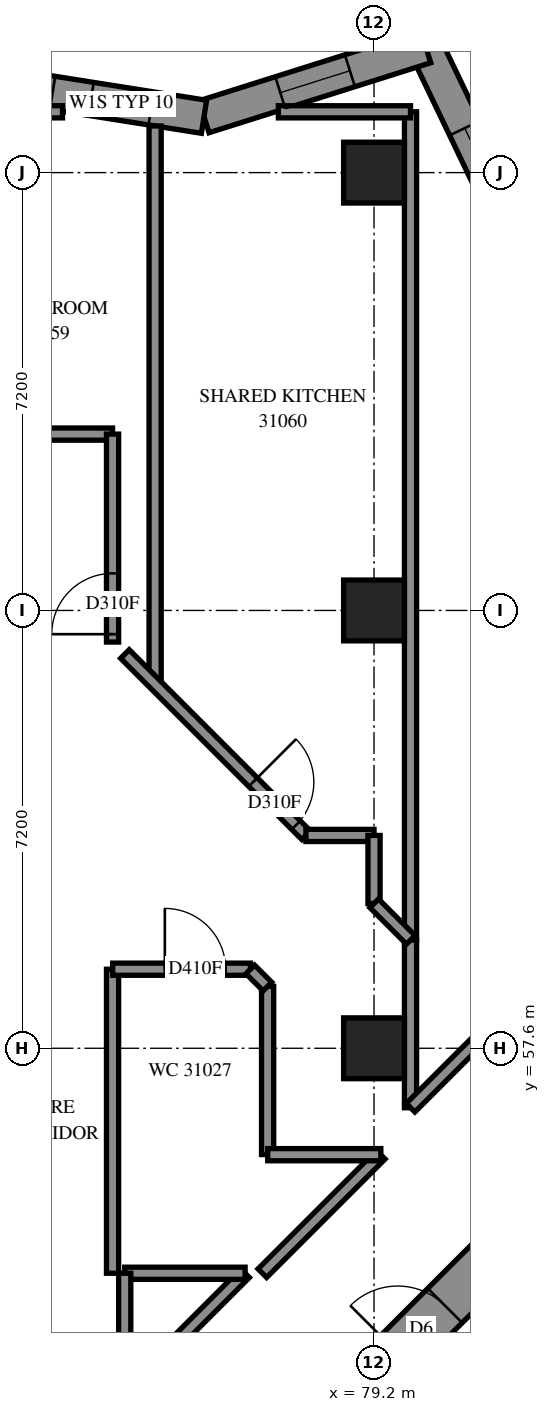
"""IFC4 building model, lengths in metres.
Left out: names, types, materials, properties, quantities, classifications, styles, units other than length and angle.
Written with IfcOpenShell. Run it as: python <this file> out.ifc"""

import sys

from ifc_helpers import new_model, si_unit, direction, frame, frame_2d, origin, origin_2d, place, context, subcontext, project, spatial, polyline, rectangle, outline, extrude, element, fill, save


model = new_model("IFC4")
c1 = context("Model", 3, precision=1e-05, world=origin(), true_north=direction((0.0, 1.0)))
c2 = subcontext(c1, "Body", "Model", "MODEL_VIEW")
j1 = project(units=[si_unit("LENGTHUNIT", "METRE"), si_unit("PLANEANGLEUNIT", "RADIAN")], contexts=[c1])
p1 = place(None, origin())
s1 = spatial("IfcSite", under=j1, at=p1, CompositionType="ELEMENT")
p2 = place(p1, origin())
s2 = spatial("IfcBuilding", under=s1, at=p2, CompositionType="ELEMENT")
p3 = place(p2, frame((0.0, 0.0, 115.2)))
s3 = spatial("IfcBuildingStorey", under=s2, at=p3, CompositionType="ELEMENT", Elevation=115.2)
for number, where, z_axis, x_axis in (
    (1, (79.2, 57.6, 0.0), (0.0, 0.0, 1.0), (1.0, 0.0, 0.0)),
    (2, (79.2, 64.8, 0.0), (0.0, 0.0, 1.0), (1.0, 0.0, 0.0)),
    (3, (79.2, 72.0, 0.0), (0.0, 0.0, 1.0), (1.0, 0.0, 0.0)),
):
    element("IfcColumn", number, at=place(p3, frame(where, z_axis=z_axis, x_axis=x_axis)), inside=s3, PredefinedType="COLUMN", context=c2, shape_type="SweptSolid", body=[
        extrude(rectangle(XDim=1.0, YDim=1.0, at=origin_2d()), origin(), (0.0, 0.0, 1.0), 3.1),
    ])
p4 = place(p3, frame((76.372, 49.373, -0.3), z_axis=(0.0, 0.0, 1.0), x_axis=(0.7071067812, 0.7071067812, 0.0)))
e4 = element("IfcWall", 4, at=p4, inside=s3, PredefinedType="SHEAR", context=c2, shape_type="SweptSolid", body=[
    extrude(rectangle(XDim=14.4, YDim=0.8, at=frame_2d((7.2, 0.0))), origin(), (0.0, 0.0, 1.0), 2.7),
])
p5 = place(p4, frame((4.55, 0.0, 0.3)))
e5 = element("IfcOpeningElement", 5, at=p5, cuts=e4, PredefinedType="OPENING", context=c2, shape_type="SweptSolid", body=[
    extrude(rectangle(XDim=1.1, YDim=2.1, at=frame_2d((0.55, 1.05))), frame((0.0, 0.41, 0.0), z_axis=(0.0, -1.0, 0.0), x_axis=(1.0, 0.0, 0.0)), (0.0, 0.0, 1.0), 0.82),
])
p6 = place(p4, frame((11.35, 0.0, 0.3)))
e6 = element("IfcOpeningElement", 6, at=p6, cuts=e4, PredefinedType="OPENING", context=c2, shape_type="SweptSolid", body=[
    extrude(rectangle(XDim=1.1, YDim=2.1, at=frame_2d((0.55, 1.05))), frame((0.0, 0.41, 0.0), z_axis=(0.0, -1.0, 0.0), x_axis=(1.0, 0.0, 0.0)), (0.0, 0.0, 1.0), 0.82),
])
p7 = place(p3, frame((81.542, 70.954, 0.0), z_axis=(0.0, 0.0, 1.0), x_axis=(-0.4318929932, 0.9019248541, 0.0)))
e7 = element("IfcWall", 7, at=p7, inside=s3, PredefinedType="SOLIDWALL", context=c2, shape_type="SweptSolid", body=[
    extrude(outline(polyline([(0.072, -0.275), (3.692, -0.275), (3.215, 0.275), (-0.072, 0.275), (0.072, -0.275)])), origin(), (0.0, 0.0, 1.0), 3.1),
])
p8 = place(p7, frame((0.77, 0.0, 0.5)))
e8 = element("IfcOpeningElement", 8, at=p8, cuts=e7, PredefinedType="OPENING", context=c2, shape_type="SweptSolid", body=[
    extrude(rectangle(XDim=1.2, YDim=2.45, at=frame_2d((0.6, 1.225))), frame((0.0, 0.285, 0.0), z_axis=(0.0, -1.0, 0.0), x_axis=(1.0, 0.0, 0.0)), (0.0, 0.0, 1.0), 0.57),
])
p9 = place(p3, frame((80.05, 74.069, 0.0), z_axis=(0.0, 0.0, 1.0), x_axis=(-0.9536522041, -0.3009110726, 0.0)))
e9 = element("IfcWall", 9, at=p9, inside=s3, PredefinedType="SOLIDWALL", context=c2, shape_type="SweptSolid", body=[
    extrude(outline(polyline([(-0.239, -0.275), (3.759, -0.275), (3.889, 0.275), (0.239, 0.275), (-0.239, -0.275)])), origin(), (0.0, 0.0, 1.0), 3.1),
])
p10 = place(p9, frame((1.308, 0.0, 0.5)))
e10 = element("IfcOpeningElement", 10, at=p10, cuts=e9, PredefinedType="OPENING", context=c2, shape_type="SweptSolid", body=[
    extrude(rectangle(XDim=1.2, YDim=2.45, at=frame_2d((0.6, 1.225))), frame((0.0, 0.285, 0.0), z_axis=(0.0, -1.0, 0.0), x_axis=(1.0, 0.0, 0.0)), (0.0, 0.0, 1.0), 0.57),
])
p11 = place(p3, frame((76.404, 72.918, 0.0), z_axis=(0.0, 0.0, 1.0), x_axis=(-0.9877221932, 0.1562205785, 0.0)))
e11 = element("IfcWall", 11, at=p11, inside=s3, PredefinedType="SOLIDWALL", context=c2, shape_type="SweptSolid", body=[
    extrude(outline(polyline([(0.065, -0.275), (3.925, -0.275), (3.838, 0.275), (-0.065, 0.275), (0.065, -0.275)])), origin(), (0.0, 0.0, 1.0), 3.1),
])
p12 = place(p11, frame((0.88, 0.0, 0.45)))
e12 = element("IfcOpeningElement", 12, at=p12, cuts=e11, PredefinedType="OPENING", context=c2, shape_type="SweptSolid", body=[
    extrude(rectangle(XDim=1.0, YDim=2.5, at=frame_2d((0.5, 1.25))), frame((0.0, 0.285, 0.0), z_axis=(0.0, -1.0, 0.0), x_axis=(1.0, 0.0, 0.0)), (0.0, 0.0, 1.0), 0.57),
])
p13 = place(p11, frame((2.521, 0.0, 0.45)))
e13 = element("IfcOpeningElement", 13, at=p13, cuts=e11, PredefinedType="OPENING", context=c2, shape_type="SweptSolid", body=[
    extrude(rectangle(XDim=1.0, YDim=2.5, at=frame_2d((0.5, 1.25))), frame((0.0, 0.285, 0.0), z_axis=(0.0, -1.0, 0.0), x_axis=(1.0, 0.0, 0.0)), (0.0, 0.0, 1.0), 0.57),
])
p14 = place(p3, frame((54.7, 67.7, 0.0), z_axis=(0.0, 0.0, 1.0), x_axis=(1.0, 0.0, 0.0)))
e14 = element("IfcWall", 14, at=p14, inside=s3, PredefinedType="PARTITIONING", context=c2, shape_type="SweptSolid", body=[
    extrude(rectangle(XDim=20.2, YDim=0.2, at=frame_2d((10.1, 0.0))), origin(), (0.0, 0.0, 1.0), 3.1),
])
p15 = place(p14, frame((5.2, 0.0, 0.0)))
e15 = element("IfcOpeningElement", 15, at=p15, cuts=e14, PredefinedType="OPENING", context=c2, shape_type="SweptSolid", body=[
    extrude(rectangle(XDim=0.9, YDim=2.1, at=frame_2d((0.45, 1.05))), frame((0.0, 0.11, 0.0), z_axis=(0.0, -1.0, 0.0), x_axis=(1.0, 0.0, 0.0)), (0.0, 0.0, 1.0), 0.22),
])
p16 = place(p14, frame((8.838, 0.0, 0.0)))
e16 = element("IfcOpeningElement", 16, at=p16, cuts=e14, PredefinedType="OPENING", context=c2, shape_type="SweptSolid", body=[
    extrude(rectangle(XDim=1.0, YDim=2.1, at=frame_2d((0.5, 1.05))), frame((0.0, 0.11, 0.0), z_axis=(0.0, -1.0, 0.0), x_axis=(1.0, 0.0, 0.0)), (0.0, 0.0, 1.0), 0.22),
])
p17 = place(p14, frame((14.1, 0.0, 0.0)))
e17 = element("IfcOpeningElement", 17, at=p17, cuts=e14, PredefinedType="OPENING", context=c2, shape_type="SweptSolid", body=[
    extrude(rectangle(XDim=0.9, YDim=2.1, at=frame_2d((0.45, 1.05))), frame((0.0, 0.11, 0.0), z_axis=(0.0, -1.0, 0.0), x_axis=(1.0, 0.0, 0.0)), (0.0, 0.0, 1.0), 0.22),
])
p18 = place(p3, frame((79.8, 59.38, 0.0), z_axis=(0.0, 0.0, 1.0), x_axis=(0.0, 1.0, 0.0)))
e18 = element("IfcWall", 18, at=p18, inside=s3, PredefinedType="PARTITIONING", context=c2, shape_type="SweptSolid", body=[
    extrude(rectangle(XDim=13.62, YDim=0.2, at=frame_2d((6.81, 0.0))), origin(), (0.0, 0.0, 1.0), 3.1),
])
p19 = place(p3, frame((75.6, 63.58, 0.0), z_axis=(0.0, 0.0, 1.0), x_axis=(0.0, 1.0, 0.0)))
e19 = element("IfcWall", 19, at=p19, inside=s3, PredefinedType="PARTITIONING", context=c2, shape_type="SweptSolid", body=[
    extrude(rectangle(XDim=9.187, YDim=0.2, at=frame_2d((4.593, 0.0))), origin(), (0.0, 0.0, 1.0), 3.1),
])
p20 = place(p3, frame((74.9, 53.9, 0.0), z_axis=(0.0, 0.0, 1.0), x_axis=(0.0, 1.0, 0.0)))
e20 = element("IfcWall", 20, at=p20, inside=s3, PredefinedType="PARTITIONING", context=c2, shape_type="SweptSolid", body=[
    extrude(rectangle(XDim=5.0, YDim=0.2, at=frame_2d((2.5, 0.0))), origin(), (0.0, 0.0, 1.0), 3.1),
])
p21 = place(p3, frame((75.103, 64.083, 0.0), z_axis=(0.0, 0.0, 1.0), x_axis=(0.7071067812, -0.7071067812, 0.0)))
e21 = element("IfcWall", 21, at=p21, inside=s3, PredefinedType="PARTITIONING", context=c2, shape_type="SweptSolid", body=[
    extrude(rectangle(XDim=4.214, YDim=0.2, at=frame_2d((2.107, 0.0))), origin(), (0.0, 0.0, 1.0), 3.1),
])
p22 = place(p21, frame((2.979, 0.0, 0.0)))
e22 = element("IfcOpeningElement", 22, at=p22, cuts=e21, PredefinedType="OPENING", context=c2, shape_type="SweptSolid", body=[
    extrude(rectangle(XDim=1.0, YDim=2.1, at=frame_2d((0.5, 1.05))), frame((0.0, 0.11, 0.0), z_axis=(0.0, -1.0, 0.0), x_axis=(1.0, 0.0, 0.0)), (0.0, 0.0, 1.0), 0.22),
])
p23 = place(p3, frame((74.9, 64.28, 0.0), z_axis=(0.0, 0.0, 1.0), x_axis=(0.0, 1.0, 0.0)))
e23 = element("IfcWall", 23, at=p23, inside=s3, PredefinedType="PARTITIONING", context=c2, shape_type="SweptSolid", body=[
    extrude(rectangle(XDim=3.42, YDim=0.2, at=frame_2d((1.71, 0.0))), origin(), (0.0, 0.0, 1.0), 3.1),
])
p24 = place(p23, frame((0.13, 0.0, 0.0)))
e24 = element("IfcOpeningElement", 24, at=p24, cuts=e23, PredefinedType="OPENING", context=c2, shape_type="SweptSolid", body=[
    extrude(rectangle(XDim=1.0, YDim=2.1, at=frame_2d((0.5, 1.05))), frame((0.0, 0.11, 0.0), z_axis=(0.0, -1.0, 0.0), x_axis=(1.0, 0.0, 0.0)), (0.0, 0.0, 1.0), 0.22),
])
p25 = place(p3, frame((71.064, 73.0, 0.0), z_axis=(0.0, 0.0, 1.0), x_axis=(1.0, 0.0, 0.0)))
e25 = element("IfcWall", 25, at=p25, inside=s3, PredefinedType="PARTITIONING", context=c2, shape_type="SweptSolid", body=[
    extrude(rectangle(XDim=3.013, YDim=0.2, at=frame_2d((1.506, 0.0))), origin(), (0.0, 0.0, 1.0), 3.1),
])
p26 = place(p3, frame((75.102, 51.922, 0.0), z_axis=(0.0, 0.0, 1.0), x_axis=(0.7071067812, 0.7071067812, 0.0)))
e26 = element("IfcWall", 26, at=p26, inside=s3, PredefinedType="PARTITIONING", context=c2, shape_type="SweptSolid", body=[
    extrude(rectangle(XDim=2.797, YDim=0.2, at=frame_2d((1.399, 0.0))), origin(), (0.0, 0.0, 1.0), 3.1),
])
p27 = place(p3, frame((77.45, 55.852, 0.0), z_axis=(0.0, 0.0, 1.0), x_axis=(0.0, 1.0, 0.0)))
e27 = element("IfcWall", 27, at=p27, inside=s3, PredefinedType="PARTITIONING", context=c2, shape_type="SweptSolid", body=[
    extrude(rectangle(XDim=2.766, YDim=0.2, at=frame_2d((1.383, 0.0))), origin(), (0.0, 0.0, 1.0), 3.1),
])
p28 = place(p3, frame((79.8, 56.622, 0.0), z_axis=(0.0, 0.0, 1.0), x_axis=(0.0, 1.0, 0.0)))
e28 = element("IfcWall", 28, at=p28, inside=s3, PredefinedType="PARTITIONING", context=c2, shape_type="SweptSolid", body=[
    extrude(rectangle(XDim=2.758, YDim=0.2, at=frame_2d((1.379, 0.0))), origin(), (0.0, 0.0, 1.0), 3.1),
])
p29 = place(p3, frame((77.363, 53.901, 0.0), z_axis=(0.0, 0.0, 1.0), x_axis=(0.7071067812, 0.7071067812, 0.0)))
e29 = element("IfcWall", 29, at=p29, inside=s3, PredefinedType="PARTITIONING", context=c2, shape_type="SweptSolid", body=[
    extrude(rectangle(XDim=2.755, YDim=0.2, at=frame_2d((1.377, 0.0))), origin(), (0.0, 0.0, 1.0), 3.1),
])
p30 = place(p3, frame((74.902, 58.9, 0.0), z_axis=(0.0, 0.0, 1.0), x_axis=(1.0, 0.0, 0.0)))
e30 = element("IfcWall", 30, at=p30, inside=s3, PredefinedType="PARTITIONING", context=c2, shape_type="SweptSolid", body=[
    extrude(rectangle(XDim=2.266, YDim=0.2, at=frame_2d((1.133, 0.0))), origin(), (0.0, 0.0, 1.0), 3.1),
])
p31 = place(p30, frame((0.858, 0.0, 0.0)))
e31 = element("IfcOpeningElement", 31, at=p31, cuts=e30, PredefinedType="OPENING", context=c2, shape_type="SweptSolid", body=[
    extrude(rectangle(XDim=1.0, YDim=2.1, at=frame_2d((0.5, 1.05))), frame((0.0, 0.11, 0.0), z_axis=(0.0, -1.0, 0.0), x_axis=(1.0, 0.0, 0.0)), (0.0, 0.0, 1.0), 0.22),
])
p32 = place(p3, frame((77.627, 73.0, 0.0), z_axis=(0.0, 0.0, 1.0), x_axis=(1.0, 0.0, 0.0)))
e32 = element("IfcWall", 32, at=p32, inside=s3, PredefinedType="PARTITIONING", context=c2, shape_type="SweptSolid", body=[
    extrude(rectangle(XDim=2.173, YDim=0.2, at=frame_2d((1.087, 0.0))), origin(), (0.0, 0.0, 1.0), 3.1),
])
p33 = place(p3, frame((75.1, 53.9, 0.0), z_axis=(0.0, 0.0, 1.0), x_axis=(1.0, 0.0, 0.0)))
e33 = element("IfcWall", 33, at=p33, inside=s3, PredefinedType="PARTITIONING", context=c2, shape_type="SweptSolid", body=[
    extrude(rectangle(XDim=1.98, YDim=0.2, at=frame_2d((0.99, 0.0))), origin(), (0.0, 0.0, 1.0), 3.1),
])
p34 = place(p3, frame((75.1, 51.922, 0.0), z_axis=(0.0, 0.0, 1.0), x_axis=(0.0, 1.0, 0.0)))
e34 = element("IfcWall", 34, at=p34, inside=s3, PredefinedType="PARTITIONING", context=c2, shape_type="SweptSolid", body=[
    extrude(rectangle(XDim=1.978, YDim=0.2, at=frame_2d((0.989, 0.0))), origin(), (0.0, 0.0, 1.0), 3.1),
])
p35 = place(p3, frame((79.802, 56.623, 0.0), z_axis=(0.0, 0.0, 1.0), x_axis=(0.7071067812, 0.7071067812, 0.0)))
e35 = element("IfcWall", 35, at=p35, inside=s3, PredefinedType="PARTITIONING", context=c2, shape_type="SweptSolid", body=[
    extrude(rectangle(XDim=1.949, YDim=0.2, at=frame_2d((0.974, 0.0))), origin(), (0.0, 0.0, 1.0), 3.1),
])
p36 = place(p3, frame((77.452, 55.85, 0.0), z_axis=(0.0, 0.0, 1.0), x_axis=(1.0, 0.0, 0.0)))
e36 = element("IfcWall", 36, at=p36, inside=s3, PredefinedType="PARTITIONING", context=c2, shape_type="SweptSolid", body=[
    extrude(rectangle(XDim=1.86, YDim=0.2, at=frame_2d((0.93, 0.0))), origin(), (0.0, 0.0, 1.0), 3.1),
])
for number, where, z_axis, x_axis in (
    (37, (78.08, 61.1, 0.0), (0.0, 0.0, 1.0), (1.0, 0.0, 0.0)),
    (38, (79.2, 59.98, 0.0), (0.0, 0.0, 1.0), (0.0, 1.0, 0.0)),
):
    element("IfcWall", number, at=place(p3, frame(where, z_axis=z_axis, x_axis=x_axis)), inside=s3, PredefinedType="PARTITIONING", context=c2, shape_type="SweptSolid", body=[
        extrude(rectangle(XDim=1.12, YDim=0.2, at=frame_2d((0.56, 0.0))), origin(), (0.0, 0.0, 1.0), 3.1),
    ])
p37 = place(p3, frame((79.203, 59.983, 0.0), z_axis=(0.0, 0.0, 1.0), x_axis=(0.7071067812, -0.7071067812, 0.0)))
e39 = element("IfcWall", 39, at=p37, inside=s3, PredefinedType="PARTITIONING", context=c2, shape_type="SweptSolid", body=[
    extrude(rectangle(XDim=0.849, YDim=0.2, at=frame_2d((0.424, 0.0))), origin(), (0.0, 0.0, 1.0), 3.1),
])
p38 = place(p3, frame((77.165, 58.897, 0.0), z_axis=(0.0, 0.0, 1.0), x_axis=(0.7071067812, -0.7071067812, 0.0)))
e40 = element("IfcWall", 40, at=p38, inside=s3, PredefinedType="PARTITIONING", context=c2, shape_type="SweptSolid", body=[
    extrude(rectangle(XDim=0.399, YDim=0.2, at=frame_2d((0.199, 0.0))), origin(), (0.0, 0.0, 1.0), 3.1),
])
p39 = place(p8, origin())
e41 = element("IfcWindow", 41, at=p39, inside=s3, PartitioningType="SINGLE_PANEL", PredefinedType="WINDOW", context=c2, shape_type="SweptSolid", body=[
    extrude(rectangle(XDim=1.2, YDim=2.45, at=frame_2d((0.6, 1.225))), frame((0.0, 0.155, 0.0), z_axis=(0.0, -1.0, 0.0), x_axis=(1.0, 0.0, 0.0)), (0.0, 0.0, 1.0), 0.06),
])
fill(e8, e41)
p40 = place(p10, origin())
e42 = element("IfcWindow", 42, at=p40, inside=s3, PartitioningType="SINGLE_PANEL", PredefinedType="WINDOW", context=c2, shape_type="SweptSolid", body=[
    extrude(rectangle(XDim=1.2, YDim=2.45, at=frame_2d((0.6, 1.225))), frame((0.0, 0.155, 0.0), z_axis=(0.0, -1.0, 0.0), x_axis=(1.0, 0.0, 0.0)), (0.0, 0.0, 1.0), 0.06),
])
fill(e10, e42)
p41 = place(p5, origin())
e43 = element("IfcDoor", 43, at=p41, inside=s3, OperationType="DOUBLE_DOOR_SINGLE_SWING", PredefinedType="DOOR", context=c2, shape_type="SweptSolid", body=[
    extrude(rectangle(XDim=1.1, YDim=2.1, at=frame_2d((0.55, 1.05))), frame((0.0, 0.025, 0.0), z_axis=(0.0, -1.0, 0.0), x_axis=(1.0, 0.0, 0.0)), (0.0, 0.0, 1.0), 0.05),
])
fill(e5, e43)
p42 = place(p31, origin())
e44 = element("IfcDoor", 44, at=p42, inside=s3, OperationType="SINGLE_SWING_RIGHT", PredefinedType="DOOR", context=c2, shape_type="SweptSolid", body=[
    extrude(rectangle(XDim=1.0, YDim=2.1, at=frame_2d((0.5, 1.05))), frame((0.0, 0.025, 0.0), z_axis=(0.0, -1.0, 0.0), x_axis=(1.0, 0.0, 0.0)), (0.0, 0.0, 1.0), 0.05),
])
fill(e31, e44)
p43 = place(p24, origin())
e45 = element("IfcDoor", 45, at=p43, inside=s3, OperationType="SINGLE_SWING_RIGHT", PredefinedType="DOOR", context=c2, shape_type="SweptSolid", body=[
    extrude(rectangle(XDim=1.0, YDim=2.1, at=frame_2d((0.5, 1.05))), frame((0.0, 0.025, 0.0), z_axis=(0.0, -1.0, 0.0), x_axis=(1.0, 0.0, 0.0)), (0.0, 0.0, 1.0), 0.05),
])
fill(e24, e45)
p44 = place(p22, origin())
e46 = element("IfcDoor", 46, at=p44, inside=s3, OperationType="SINGLE_SWING_LEFT", PredefinedType="DOOR", context=c2, shape_type="SweptSolid", body=[
    extrude(rectangle(XDim=1.0, YDim=2.1, at=frame_2d((0.5, 1.05))), frame((0.0, 0.025, 0.0), z_axis=(0.0, -1.0, 0.0), x_axis=(1.0, 0.0, 0.0)), (0.0, 0.0, 1.0), 0.05),
])
fill(e22, e46)
p45 = place(p12, origin())
e47 = element("IfcWindow", 47, at=p45, inside=s3, PartitioningType="SINGLE_PANEL", PredefinedType="WINDOW", context=c2, shape_type="SweptSolid", body=[
    extrude(rectangle(XDim=1.0, YDim=2.5, at=frame_2d((0.5, 1.25))), frame((0.0, 0.155, 0.0), z_axis=(0.0, -1.0, 0.0), x_axis=(1.0, 0.0, 0.0)), (0.0, 0.0, 1.0), 0.06),
])
fill(e12, e47)
save(model, sys.argv[1])
